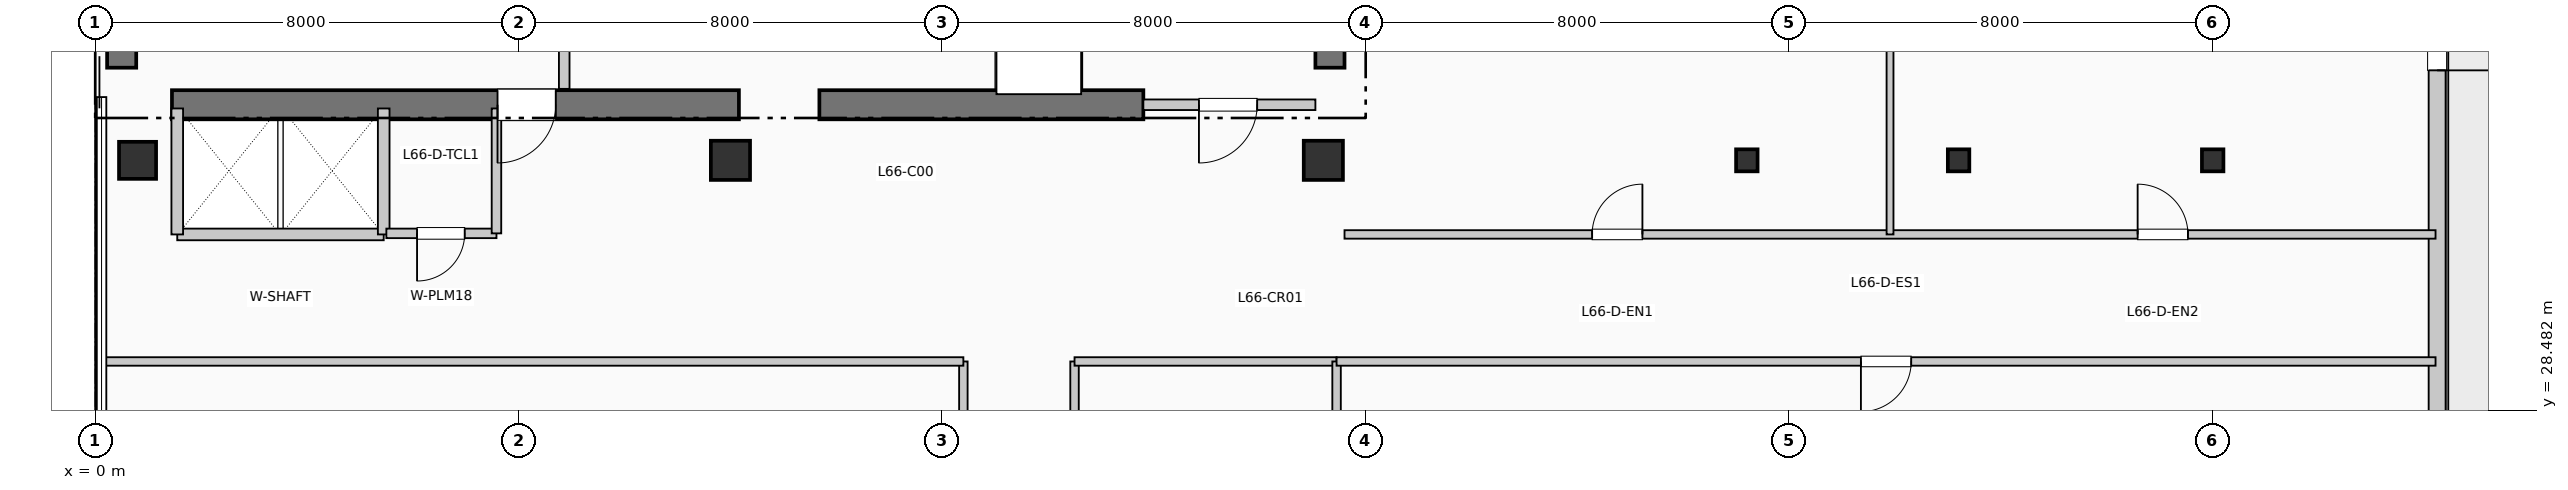
"""IFC4 building model, lengths in metres.
Left out: names, types, materials, properties, quantities, classifications, styles, units other than length and angle.
Written with IfcOpenShell. Run it as: python <this file> out.ifc"""

import sys

from ifc_helpers import new_model, si_unit, direction, frame, frame_2d, origin, origin_2d, place, context, subcontext, project, spatial, rectangle, i_section, extrude, element, fill, save


model = new_model("IFC4")
c1 = context("Model", 3, precision=1e-05, world=origin(), true_north=direction((0.0, 1.0)))
c2 = subcontext(c1, "Body", "Model", "MODEL_VIEW")
j1 = project(units=[si_unit("LENGTHUNIT", "METRE"), si_unit("PLANEANGLEUNIT", "RADIAN")], contexts=[c1])
p1 = place(None, origin())
s1 = spatial("IfcSite", under=j1, at=p1, CompositionType="ELEMENT")
p2 = place(p1, origin())
s2 = spatial("IfcBuilding", under=s1, at=p2, CompositionType="ELEMENT")
p3 = place(p2, frame((0.0, 0.0, 272.25)))
s3 = spatial("IfcBuildingStorey", under=s2, at=p3, CompositionType="ELEMENT", Elevation=272.25)
p4 = place(p3, frame((0.5, 34.95, 0.0), z_axis=(0.0, 0.0, 1.0), x_axis=(0.0, 1.0, 0.0)))
e1 = element("IfcWall", 1, at=p4, inside=s3, PredefinedType="SHEAR", context=c2, shape_type="SweptSolid", body=[
    extrude(rectangle(XDim=7.9, YDim=0.55, at=frame_2d((3.95, 0.0))), origin(), (0.0, 0.0, 1.0), 3.96),
])
p5 = place(p3, frame((23.325, 34.95, 0.0), z_axis=(0.0, 0.0, 1.0), x_axis=(0.0, 1.0, 0.0)))
e2 = element("IfcWall", 2, at=p5, inside=s3, PredefinedType="SHEAR", context=c2, shape_type="SweptSolid", body=[
    extrude(rectangle(XDim=10.64, YDim=0.55, at=frame_2d((5.32, 0.0))), origin(), (0.0, 0.0, 1.0), 3.96),
])
p6 = place(p3, frame((1.45, 34.25, 0.0), z_axis=(0.0, 0.0, 1.0), x_axis=(1.0, 0.0, 0.0)))
e3 = element("IfcWall", 3, at=p6, inside=s3, PredefinedType="SHEAR", context=c2, shape_type="SweptSolid", body=[
    extrude(rectangle(XDim=10.71, YDim=0.55, at=frame_2d((5.355, 0.0))), origin(), (0.0, 0.0, 1.0), 3.96),
])
p7 = place(p6, frame((7.25, 0.0, 0.0), z_axis=(0.0, 0.0, 1.0), x_axis=(-1.0, 0.0, 0.0)))
e4 = element("IfcOpeningElement", 4, at=p7, cuts=e3, PredefinedType="OPENING", context=c2, shape_type="SweptSolid", body=[
    extrude(rectangle(XDim=1.1, YDim=2.15, at=frame_2d((0.55, 1.075))), frame((0.0, 0.285, 0.0), z_axis=(0.0, -1.0, 0.0), x_axis=(1.0, 0.0, 0.0)), (0.0, 0.0, 1.0), 0.57),
])
p8 = place(p3, frame((13.68, 34.25, 0.0), z_axis=(0.0, 0.0, 1.0), x_axis=(1.0, 0.0, 0.0)))
e5 = element("IfcWall", 5, at=p8, inside=s3, PredefinedType="SHEAR", context=c2, shape_type="SweptSolid", body=[
    extrude(rectangle(XDim=6.12, YDim=0.55, at=frame_2d((3.06, 0.0))), origin(), (0.0, 0.0, 1.0), 3.96),
])
p9 = place(p3, frame((0.8, 33.2, 0.0), z_axis=(0.0, 0.0, 1.0), x_axis=(1.0, 0.0, 0.0)))
e6 = element("IfcColumn", 6, at=p9, inside=s3, PredefinedType="COLUMN", context=c2, shape_type="SweptSolid", body=[
    extrude(rectangle(XDim=0.7, YDim=0.7, at=origin_2d()), origin(), (0.0, 0.0, 1.0), 3.96),
])
for number, where, z_axis, x_axis in (
    (7, (12.0, 33.2, 0.0), (0.0, 0.0, 1.0), (1.0, 0.0, 0.0)),
    (8, (23.2, 33.2, 0.0), (0.0, 0.0, 1.0), (1.0, 0.0, 0.0)),
):
    element("IfcColumn", number, at=place(p3, frame(where, z_axis=z_axis, x_axis=x_axis)), inside=s3, PredefinedType="COLUMN", context=c2, shape_type="SweptSolid", body=[
        extrude(rectangle(XDim=0.74, YDim=0.74, at=origin_2d()), origin(), (0.0, 0.0, 1.0), 3.96),
    ])
for number, where, z_axis, x_axis in (
    (9, (31.2, 33.2, 0.0), (0.0, 0.0, 1.0), (1.0, 0.0, 0.0)),
    (10, (35.2, 33.2, 0.0), (0.0, 0.0, 1.0), (1.0, 0.0, 0.0)),
    (11, (40.0, 33.2, 0.0), (0.0, 0.0, 1.0), (1.0, 0.0, 0.0)),
):
    element("IfcColumn", number, at=place(p3, frame(where, z_axis=z_axis, x_axis=x_axis)), inside=s3, PredefinedType="COLUMN", context=c2, shape_type="SweptSolid", body=[
        extrude(i_section(OverallWidth=0.406, OverallDepth=0.416, WebThickness=0.022, FlangeThickness=0.036, at=origin_2d()), origin(), (0.0, 0.0, 1.0), 3.96),
    ])
p10 = place(p3, frame((44.24, 28.055, 0.0), z_axis=(0.0, 0.0, 1.0), x_axis=(0.0, 1.0, 0.0)))
e12 = element("IfcWall", 12, at=p10, inside=s3, PredefinedType="SOLIDWALL", context=c2, shape_type="SweptSolid", body=[
    extrude(rectangle(XDim=14.89, YDim=0.32, at=frame_2d((7.445, 0.0))), origin(), (0.0, 0.0, 1.0), 3.74),
])
p11 = place(p10, frame((7.945, 0.0, 0.0), z_axis=(0.0, 0.0, 1.0), x_axis=(-1.0, 0.0, 0.0)))
e13 = element("IfcOpeningElement", 13, at=p11, cuts=e12, PredefinedType="OPENING", context=c2, shape_type="SweptSolid", body=[
    extrude(rectangle(XDim=1.1, YDim=2.2, at=frame_2d((0.55, 1.1))), frame((0.0, 0.17, 0.0), z_axis=(0.0, -1.0, 0.0), x_axis=(1.0, 0.0, 0.0)), (0.0, 0.0, 1.0), 0.34),
])
p12 = place(p3, frame((8.86, 34.55, 0.0), z_axis=(0.0, 0.0, 1.0), x_axis=(0.0, 1.0, 0.0)))
e14 = element("IfcWall", 14, at=p12, inside=s3, PredefinedType="PARTITIONING", context=c2, shape_type="SweptSolid", body=[
    extrude(rectangle(XDim=2.5, YDim=0.2, at=frame_2d((1.25, 0.0))), origin(), (0.0, 0.0, 1.0), 3.74),
])
p13 = place(p3, frame((19.8, 34.25, 0.0), z_axis=(0.0, 0.0, 1.0), x_axis=(1.0, 0.0, 0.0)))
e15 = element("IfcWall", 15, at=p13, inside=s3, PredefinedType="PARTITIONING", context=c2, shape_type="SweptSolid", body=[
    extrude(rectangle(XDim=3.25, YDim=0.2, at=frame_2d((1.625, 0.0))), origin(), (0.0, 0.0, 1.0), 3.74),
])
p14 = place(p13, frame((2.15, 0.0, 0.0), z_axis=(0.0, 0.0, 1.0), x_axis=(-1.0, 0.0, 0.0)))
e16 = element("IfcOpeningElement", 16, at=p14, cuts=e15, PredefinedType="OPENING", context=c2, shape_type="SweptSolid", body=[
    extrude(rectangle(XDim=1.1, YDim=2.15, at=frame_2d((0.55, 1.075))), frame((0.0, 0.11, 0.0), z_axis=(0.0, -1.0, 0.0), x_axis=(1.0, 0.0, 0.0)), (0.0, 0.0, 1.0), 0.22),
])
p15 = place(p3, frame((1.55, 31.8, 0.0), z_axis=(0.0, 0.0, 1.0), x_axis=(1.0, 0.0, 0.0)))
e17 = element("IfcWall", 17, at=p15, inside=s3, PredefinedType="PARTITIONING", context=c2, shape_type="SweptSolid", body=[
    extrude(rectangle(XDim=3.9, YDim=0.22, at=frame_2d((1.95, 0.0))), origin(), (0.0, 0.0, 1.0), 3.74),
])
for number, where, z_axis, x_axis in (
    (18, (1.55, 31.8, 0.0), (0.0, 0.0, 1.0), (0.0, 1.0, 0.0)),
    (19, (5.45, 31.8, 0.0), (0.0, 0.0, 1.0), (0.0, 1.0, 0.0)),
):
    element("IfcWall", number, at=place(p3, frame(where, z_axis=z_axis, x_axis=x_axis)), inside=s3, PredefinedType="PARTITIONING", context=c2, shape_type="SweptSolid", body=[
        extrude(rectangle(XDim=2.38, YDim=0.22, at=frame_2d((1.19, 0.0))), origin(), (0.0, 0.0, 1.0), 3.74),
    ])
p16 = place(p3, frame((5.5, 31.82, 0.0), z_axis=(0.0, 0.0, 1.0), x_axis=(1.0, 0.0, 0.0)))
e20 = element("IfcWall", 20, at=p16, inside=s3, PredefinedType="PLUMBINGWALL", context=c2, shape_type="SweptSolid", body=[
    extrude(rectangle(XDim=2.08, YDim=0.18, at=frame_2d((1.04, 0.0))), origin(), (0.0, 0.0, 1.0), 3.74),
])
p17 = place(p16, frame((1.48, 0.0, 0.0), z_axis=(0.0, 0.0, 1.0), x_axis=(-1.0, 0.0, 0.0)))
e21 = element("IfcOpeningElement", 21, at=p17, cuts=e20, PredefinedType="OPENING", context=c2, shape_type="SweptSolid", body=[
    extrude(rectangle(XDim=0.9, YDim=2.1, at=frame_2d((0.45, 1.05))), frame((0.0, 0.1, 0.0), z_axis=(0.0, -1.0, 0.0), x_axis=(1.0, 0.0, 0.0)), (0.0, 0.0, 1.0), 0.2),
])
p18 = place(p3, frame((7.58, 31.82, 0.0), z_axis=(0.0, 0.0, 1.0), x_axis=(0.0, 1.0, 0.0)))
e22 = element("IfcWall", 22, at=p18, inside=s3, PredefinedType="PLUMBINGWALL", context=c2, shape_type="SweptSolid", body=[
    extrude(rectangle(XDim=2.36, YDim=0.18, at=frame_2d((1.18, 0.0))), origin(), (0.0, 0.0, 1.0), 3.74),
])
p19 = place(p3, frame((16.4, 15.0, 0.0), z_axis=(0.0, 0.0, 1.0), x_axis=(0.0, 1.0, 0.0)))
e23 = element("IfcWall", 23, at=p19, inside=s3, PredefinedType="PARTITIONING", context=c2, shape_type="SweptSolid", body=[
    extrude(rectangle(XDim=14.4, YDim=0.16, at=frame_2d((7.2, 0.0))), origin(), (0.0, 0.0, 1.0), 3.74),
])
p20 = place(p19, frame((3.283, 0.0, 0.0), z_axis=(0.0, 0.0, 1.0), x_axis=(-1.0, 0.0, 0.0)))
e24 = element("IfcOpeningElement", 24, at=p20, cuts=e23, PredefinedType="OPENING", context=c2, shape_type="SweptSolid", body=[
    extrude(rectangle(XDim=0.95, YDim=2.15, at=frame_2d((0.475, 1.075))), frame((0.0, 0.09, 0.0), z_axis=(0.0, -1.0, 0.0), x_axis=(1.0, 0.0, 0.0)), (0.0, 0.0, 1.0), 0.18),
])
p21 = place(p19, frame((7.603, 0.0, 0.0), z_axis=(0.0, 0.0, 1.0), x_axis=(-1.0, 0.0, 0.0)))
e25 = element("IfcOpeningElement", 25, at=p21, cuts=e23, PredefinedType="OPENING", context=c2, shape_type="SweptSolid", body=[
    extrude(rectangle(XDim=0.95, YDim=2.15, at=frame_2d((0.475, 1.075))), frame((0.0, 0.09, 0.0), z_axis=(0.0, -1.0, 0.0), x_axis=(1.0, 0.0, 0.0)), (0.0, 0.0, 1.0), 0.18),
])
p22 = place(p19, frame((10.555, 0.0, 0.0), z_axis=(0.0, 0.0, 1.0), x_axis=(-1.0, 0.0, 0.0)))
e26 = element("IfcOpeningElement", 26, at=p22, cuts=e23, PredefinedType="OPENING", context=c2, shape_type="SweptSolid", body=[
    extrude(rectangle(XDim=0.95, YDim=2.15, at=frame_2d((0.475, 1.075))), frame((0.0, 0.09, 0.0), z_axis=(0.0, -1.0, 0.0), x_axis=(1.0, 0.0, 0.0)), (0.0, 0.0, 1.0), 0.18),
])
p23 = place(p19, frame((13.435, 0.0, 0.0), z_axis=(0.0, 0.0, 1.0), x_axis=(-1.0, 0.0, 0.0)))
e27 = element("IfcOpeningElement", 27, at=p23, cuts=e23, PredefinedType="OPENING", context=c2, shape_type="SweptSolid", body=[
    extrude(rectangle(XDim=0.95, YDim=2.15, at=frame_2d((0.475, 1.075))), frame((0.0, 0.09, 0.0), z_axis=(0.0, -1.0, 0.0), x_axis=(1.0, 0.0, 0.0)), (0.0, 0.0, 1.0), 0.18),
])
p24 = place(p3, frame((18.5, 15.0, 0.0), z_axis=(0.0, 0.0, 1.0), x_axis=(0.0, 1.0, 0.0)))
e28 = element("IfcWall", 28, at=p24, inside=s3, PredefinedType="PARTITIONING", context=c2, shape_type="SweptSolid", body=[
    extrude(rectangle(XDim=14.4, YDim=0.16, at=frame_2d((7.2, 0.0))), origin(), (0.0, 0.0, 1.0), 3.74),
])
p25 = place(p24, frame((6.725, 0.0, 0.0)))
e29 = element("IfcOpeningElement", 29, at=p25, cuts=e28, PredefinedType="OPENING", context=c2, shape_type="SweptSolid", body=[
    extrude(rectangle(XDim=0.95, YDim=2.15, at=frame_2d((0.475, 1.075))), frame((0.0, 0.09, 0.0), z_axis=(0.0, -1.0, 0.0), x_axis=(1.0, 0.0, 0.0)), (0.0, 0.0, 1.0), 0.18),
])
p26 = place(p3, frame((0.19, 29.4, 0.0), z_axis=(0.0, 0.0, 1.0), x_axis=(1.0, 0.0, 0.0)))
e30 = element("IfcWall", 30, at=p26, inside=s3, PredefinedType="PARTITIONING", context=c2, shape_type="SweptSolid", body=[
    extrude(rectangle(XDim=16.21, YDim=0.16, at=frame_2d((8.105, 0.0))), origin(), (0.0, 0.0, 1.0), 3.425),
])
p27 = place(p3, frame((18.5, 29.4, 0.0), z_axis=(0.0, 0.0, 1.0), x_axis=(1.0, 0.0, 0.0)))
e31 = element("IfcWall", 31, at=p27, inside=s3, PredefinedType="PARTITIONING", context=c2, shape_type="SweptSolid", body=[
    extrude(rectangle(XDim=4.95, YDim=0.16, at=frame_2d((2.475, 0.0))), origin(), (0.0, 0.0, 1.0), 3.425),
])
p28 = place(p3, frame((23.45, 5.99, 0.0), z_axis=(0.0, 0.0, 1.0), x_axis=(0.0, 1.0, 0.0)))
e32 = element("IfcWall", 32, at=p28, inside=s3, PredefinedType="PARTITIONING", context=c2, shape_type="SweptSolid", body=[
    extrude(rectangle(XDim=23.41, YDim=0.16, at=frame_2d((11.705, 0.0))), origin(), (0.0, 0.0, 1.0), 3.175),
])
p29 = place(p3, frame((23.45, 29.4, 0.0), z_axis=(0.0, 0.0, 1.0), x_axis=(1.0, 0.0, 0.0)))
e33 = element("IfcWall", 33, at=p29, inside=s3, PredefinedType="PARTITIONING", context=c2, shape_type="SweptSolid", body=[
    extrude(rectangle(XDim=20.76, YDim=0.16, at=frame_2d((10.38, 0.0))), origin(), (0.0, 0.0, 1.0), 3.425),
])
p30 = place(p29, frame((10.855, 0.0, 0.0), z_axis=(0.0, 0.0, 1.0), x_axis=(-1.0, 0.0, 0.0)))
e34 = element("IfcOpeningElement", 34, at=p30, cuts=e33, PredefinedType="OPENING", context=c2, shape_type="SweptSolid", body=[
    extrude(rectangle(XDim=0.95, YDim=2.15, at=frame_2d((0.475, 1.075))), frame((0.0, 0.09, 0.0), z_axis=(0.0, -1.0, 0.0), x_axis=(1.0, 0.0, 0.0)), (0.0, 0.0, 1.0), 0.18),
])
p31 = place(p3, frame((23.6, 31.8, 0.0), z_axis=(0.0, 0.0, 1.0), x_axis=(1.0, 0.0, 0.0)))
e35 = element("IfcWall", 35, at=p31, inside=s3, PredefinedType="PARTITIONING", context=c2, shape_type="SweptSolid", body=[
    extrude(rectangle(XDim=20.61, YDim=0.16, at=frame_2d((10.305, 0.0))), origin(), (0.0, 0.0, 1.0), 3.74),
])
p32 = place(p31, frame((4.677, 0.0, 0.0)))
e36 = element("IfcOpeningElement", 36, at=p32, cuts=e35, PredefinedType="OPENING", context=c2, shape_type="SweptSolid", body=[
    extrude(rectangle(XDim=0.95, YDim=2.15, at=frame_2d((0.475, 1.075))), frame((0.0, 0.09, 0.0), z_axis=(0.0, -1.0, 0.0), x_axis=(1.0, 0.0, 0.0)), (0.0, 0.0, 1.0), 0.18),
])
p33 = place(p31, frame((14.982, 0.0, 0.0)))
e37 = element("IfcOpeningElement", 37, at=p33, cuts=e35, PredefinedType="OPENING", context=c2, shape_type="SweptSolid", body=[
    extrude(rectangle(XDim=0.95, YDim=2.15, at=frame_2d((0.475, 1.075))), frame((0.0, 0.09, 0.0), z_axis=(0.0, -1.0, 0.0), x_axis=(1.0, 0.0, 0.0)), (0.0, 0.0, 1.0), 0.18),
])
p34 = place(p3, frame((33.905, 31.8, 0.0), z_axis=(0.0, 0.0, 1.0), x_axis=(0.0, 1.0, 0.0)))
e38 = element("IfcWall", 38, at=p34, inside=s3, PredefinedType="PARTITIONING", context=c2, shape_type="SweptSolid", body=[
    extrude(rectangle(XDim=14.01, YDim=0.13, at=frame_2d((7.005, 0.0))), origin(), (0.0, 0.0, 1.0), 3.74),
])
p35 = place(p11, origin())
e39 = element("IfcDoor", 39, at=p35, inside=s3, OperationType="SINGLE_SWING_LEFT", PredefinedType="DOOR", context=c2, shape_type="SweptSolid", body=[
    extrude(rectangle(XDim=1.1, YDim=2.2, at=frame_2d((0.55, 1.1))), frame((0.0, 0.025, 0.0), z_axis=(0.0, -1.0, 0.0), x_axis=(1.0, 0.0, 0.0)), (0.0, 0.0, 1.0), 0.05),
])
fill(e13, e39)
p36 = place(p7, origin())
e40 = element("IfcDoor", 40, at=p36, inside=s3, OperationType="SINGLE_SWING_LEFT", PredefinedType="DOOR", context=c2, shape_type="SweptSolid", body=[
    extrude(rectangle(XDim=1.1, YDim=2.15, at=frame_2d((0.55, 1.075))), frame((0.0, 0.025, 0.0), z_axis=(0.0, -1.0, 0.0), x_axis=(1.0, 0.0, 0.0)), (0.0, 0.0, 1.0), 0.05),
])
fill(e4, e40)
p37 = place(p14, origin())
e41 = element("IfcDoor", 41, at=p37, inside=s3, OperationType="SINGLE_SWING_LEFT", PredefinedType="DOOR", context=c2, shape_type="SweptSolid", body=[
    extrude(rectangle(XDim=1.1, YDim=2.15, at=frame_2d((0.55, 1.075))), frame((0.0, 0.025, 0.0), z_axis=(0.0, -1.0, 0.0), x_axis=(1.0, 0.0, 0.0)), (0.0, 0.0, 1.0), 0.05),
])
fill(e16, e41)
p38 = place(p17, origin())
e42 = element("IfcDoor", 42, at=p38, inside=s3, OperationType="SINGLE_SWING_LEFT", PredefinedType="DOOR", context=c2, shape_type="SweptSolid", body=[
    extrude(rectangle(XDim=0.9, YDim=2.1, at=frame_2d((0.45, 1.05))), frame((0.0, 0.025, 0.0), z_axis=(0.0, -1.0, 0.0), x_axis=(1.0, 0.0, 0.0)), (0.0, 0.0, 1.0), 0.05),
])
fill(e21, e42)
p39 = place(p30, origin())
e43 = element("IfcDoor", 43, at=p39, inside=s3, OperationType="SINGLE_SWING_LEFT", PredefinedType="DOOR", context=c2, shape_type="SweptSolid", body=[
    extrude(rectangle(XDim=0.95, YDim=2.15, at=frame_2d((0.475, 1.075))), frame((0.0, 0.025, 0.0), z_axis=(0.0, -1.0, 0.0), x_axis=(1.0, 0.0, 0.0)), (0.0, 0.0, 1.0), 0.05),
])
fill(e34, e43)
p40 = place(p32, origin())
e44 = element("IfcDoor", 44, at=p40, inside=s3, OperationType="SINGLE_SWING_RIGHT", PredefinedType="DOOR", context=c2, shape_type="SweptSolid", body=[
    extrude(rectangle(XDim=0.95, YDim=2.15, at=frame_2d((0.475, 1.075))), frame((0.0, 0.025, 0.0), z_axis=(0.0, -1.0, 0.0), x_axis=(1.0, 0.0, 0.0)), (0.0, 0.0, 1.0), 0.05),
])
fill(e36, e44)
p41 = place(p33, origin())
e45 = element("IfcDoor", 45, at=p41, inside=s3, OperationType="SINGLE_SWING_LEFT", PredefinedType="DOOR", context=c2, shape_type="SweptSolid", body=[
    extrude(rectangle(XDim=0.95, YDim=2.15, at=frame_2d((0.475, 1.075))), frame((0.0, 0.025, 0.0), z_axis=(0.0, -1.0, 0.0), x_axis=(1.0, 0.0, 0.0)), (0.0, 0.0, 1.0), 0.05),
])
fill(e37, e45)
save(model, sys.argv[1])
